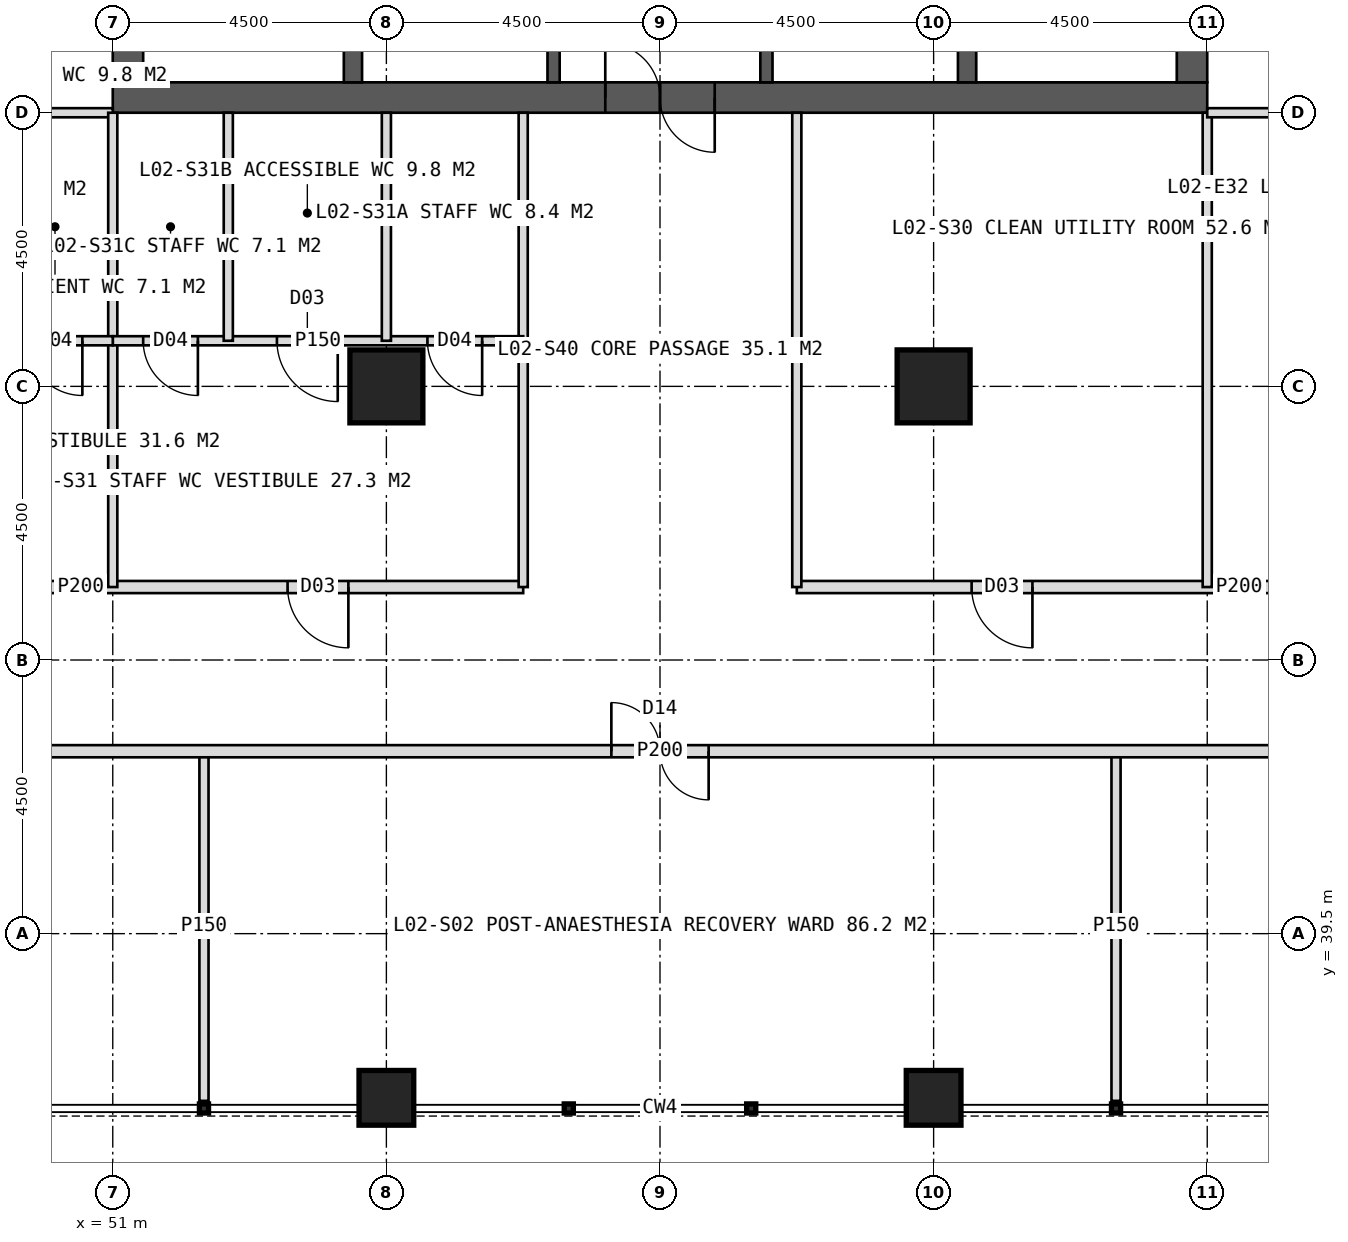
"""IFC4 building model, lengths in metres.
Left out: names, types, materials, properties, quantities, classifications, styles, units other than length and angle.
Written with IfcOpenShell. Run it as: python <this file> out.ifc"""

import sys

from ifc_helpers import new_model, si_unit, direction, frame, frame_2d, origin, origin_2d, place, context, subcontext, project, spatial, rectangle, hollow_rectangle, extrude, element, fill, save


model = new_model("IFC4")
c1 = context("Model", 3, precision=1e-05, world=origin(), true_north=direction((0.0, 1.0)))
c2 = subcontext(c1, "Body", "Model", "MODEL_VIEW")
j1 = project(units=[si_unit("LENGTHUNIT", "METRE"), si_unit("PLANEANGLEUNIT", "RADIAN")], contexts=[c1])
p1 = place(None, origin())
s1 = spatial("IfcSite", under=j1, at=p1, CompositionType="ELEMENT")
p2 = place(p1, origin())
s2 = spatial("IfcBuilding", under=s1, at=p2, CompositionType="ELEMENT")
p3 = place(p2, frame((0.0, 0.0, 11.0)))
s3 = spatial("IfcBuildingStorey", under=s2, at=p3, CompositionType="ELEMENT", Elevation=11.0)
p4 = place(p3, frame((51.0, 53.25, 0.0), z_axis=(0.0, 0.0, 1.0), x_axis=(1.0, 0.0, 0.0)))
e1 = element("IfcWall", 1, at=p4, inside=s3, PredefinedType="SHEAR", context=c2, shape_type="SweptSolid", body=[
    extrude(rectangle(XDim=18.0, YDim=0.5, at=frame_2d((9.0, 0.0))), origin(), (0.0, 0.0, 1.0), 5.5),
])
p5 = place(p4, frame((8.1, 0.0, 0.0)))
e2 = element("IfcOpeningElement", 2, at=p5, cuts=e1, PredefinedType="OPENING", context=c2, shape_type="SweptSolid", body=[
    extrude(rectangle(XDim=1.8, YDim=2.2, at=frame_2d((0.9, 1.1))), frame((0.0, 0.26, 0.0), z_axis=(0.0, -1.0, 0.0), x_axis=(1.0, 0.0, 0.0)), (0.0, 0.0, 1.0), 0.52),
])
p6 = place(p3, frame((51.25, 53.5, 0.0), z_axis=(0.0, 0.0, 1.0), x_axis=(0.0, 1.0, 0.0)))
e3 = element("IfcWall", 3, at=p6, inside=s3, PredefinedType="SHEAR", context=c2, shape_type="SweptSolid", body=[
    extrude(rectangle(XDim=17.0, YDim=0.5, at=frame_2d((8.5, 0.0))), origin(), (0.0, 0.0, 1.0), 5.5),
])
p7 = place(p6, frame((6.0, 0.0, 0.0)))
e4 = element("IfcOpeningElement", 4, at=p7, cuts=e3, PredefinedType="OPENING", context=c2, shape_type="SweptSolid", body=[
    extrude(rectangle(XDim=1.5, YDim=2.2, at=frame_2d((0.75, 1.1))), frame((0.0, 0.26, 0.0), z_axis=(0.0, -1.0, 0.0), x_axis=(1.0, 0.0, 0.0)), (0.0, 0.0, 1.0), 0.52),
])
p8 = place(p3, frame((68.75, 53.5, 0.0), z_axis=(0.0, 0.0, 1.0), x_axis=(0.0, 1.0, 0.0)))
e5 = element("IfcWall", 5, at=p8, inside=s3, PredefinedType="SHEAR", context=c2, shape_type="SweptSolid", body=[
    extrude(rectangle(XDim=17.0, YDim=0.5, at=frame_2d((8.5, 0.0))), origin(), (0.0, 0.0, 1.0), 5.5),
])
p9 = place(p8, frame((9.5, 0.0, 0.0)))
e6 = element("IfcOpeningElement", 6, at=p9, cuts=e5, PredefinedType="OPENING", context=c2, shape_type="SweptSolid", body=[
    extrude(rectangle(XDim=1.5, YDim=2.2, at=frame_2d((0.75, 1.1))), frame((0.0, 0.26, 0.0), z_axis=(0.0, -1.0, 0.0), x_axis=(1.0, 0.0, 0.0)), (0.0, 0.0, 1.0), 0.52),
])
for number, where, z_axis, x_axis in (
    (7, (54.95, 53.5, 0.0), (0.0, 0.0, 1.0), (0.0, 1.0, 0.0)),
    (8, (65.05, 53.5, 0.0), (0.0, 0.0, 1.0), (0.0, 1.0, 0.0)),
):
    element("IfcWall", number, at=place(p3, frame(where, z_axis=z_axis, x_axis=x_axis)), inside=s3, PredefinedType="SHEAR", context=c2, shape_type="SweptSolid", body=[
        extrude(rectangle(XDim=17.0, YDim=0.3, at=frame_2d((8.5, 0.0))), origin(), (0.0, 0.0, 1.0), 5.5),
    ])
p10 = place(p3, frame((58.25, 53.5, 0.0), z_axis=(0.0, 0.0, 1.0), x_axis=(0.0, 1.0, 0.0)))
e9 = element("IfcWall", 9, at=p10, inside=s3, PredefinedType="SHEAR", context=c2, shape_type="SweptSolid", body=[
    extrude(rectangle(XDim=17.0, YDim=0.2, at=frame_2d((8.5, 0.0))), origin(), (0.0, 0.0, 1.0), 5.5),
])
p11 = place(p10, frame((1.375, 0.0, 0.0)))
e10 = element("IfcOpeningElement", 10, at=p11, cuts=e9, PredefinedType="OPENING", context=c2, shape_type="SweptSolid", body=[
    extrude(rectangle(XDim=1.4, YDim=2.2, at=frame_2d((0.7, 1.1))), frame((0.0, 0.11, 0.0), z_axis=(0.0, -1.0, 0.0), x_axis=(1.0, 0.0, 0.0)), (0.0, 0.0, 1.0), 0.22),
])
p12 = place(p10, frame((5.675, 0.0, 0.0)))
e11 = element("IfcOpeningElement", 11, at=p12, cuts=e9, PredefinedType="OPENING", context=c2, shape_type="SweptSolid", body=[
    extrude(rectangle(XDim=1.4, YDim=2.2, at=frame_2d((0.7, 1.1))), frame((0.0, 0.11, 0.0), z_axis=(0.0, -1.0, 0.0), x_axis=(1.0, 0.0, 0.0)), (0.0, 0.0, 1.0), 0.22),
])
p13 = place(p3, frame((61.75, 53.5, 0.0), z_axis=(0.0, 0.0, 1.0), x_axis=(0.0, 1.0, 0.0)))
e12 = element("IfcWall", 12, at=p13, inside=s3, PredefinedType="SHEAR", context=c2, shape_type="SweptSolid", body=[
    extrude(rectangle(XDim=17.0, YDim=0.2, at=frame_2d((8.5, 0.0))), origin(), (0.0, 0.0, 1.0), 5.5),
])
p14 = place(p13, frame((1.375, 0.0, 0.0)))
e13 = element("IfcOpeningElement", 13, at=p14, cuts=e12, PredefinedType="OPENING", context=c2, shape_type="SweptSolid", body=[
    extrude(rectangle(XDim=1.4, YDim=2.2, at=frame_2d((0.7, 1.1))), frame((0.0, 0.11, 0.0), z_axis=(0.0, -1.0, 0.0), x_axis=(1.0, 0.0, 0.0)), (0.0, 0.0, 1.0), 0.22),
])
p15 = place(p13, frame((5.675, 0.0, 0.0)))
e14 = element("IfcOpeningElement", 14, at=p15, cuts=e12, PredefinedType="OPENING", context=c2, shape_type="SweptSolid", body=[
    extrude(rectangle(XDim=1.4, YDim=2.2, at=frame_2d((0.7, 1.1))), frame((0.0, 0.11, 0.0), z_axis=(0.0, -1.0, 0.0), x_axis=(1.0, 0.0, 0.0)), (0.0, 0.0, 1.0), 0.22),
])
for number, where, z_axis, x_axis in (
    (15, (55.5, 48.5, 0.0), (0.0, 0.0, 1.0), (1.0, 0.0, 0.0)),
    (16, (64.5, 48.5, 0.0), (0.0, 0.0, 1.0), (1.0, 0.0, 0.0)),
):
    element("IfcColumn", number, at=place(p3, frame(where, z_axis=z_axis, x_axis=x_axis)), inside=s3, PredefinedType="COLUMN", context=c2, shape_type="SweptSolid", body=[
        extrude(hollow_rectangle(XDim=1.2, YDim=1.2, WallThickness=0.1, at=origin_2d()), origin(), (0.0, 0.0, 1.0), 5.5),
    ])
for number, where, z_axis, x_axis in (
    (17, (55.5, 36.8, 0.0), (0.0, 0.0, 1.0), (1.0, 0.0, 0.0)),
    (18, (64.5, 36.8, 0.0), (0.0, 0.0, 1.0), (1.0, 0.0, 0.0)),
):
    element("IfcColumn", number, at=place(p3, frame(where, z_axis=z_axis, x_axis=x_axis)), inside=s3, PredefinedType="COLUMN", context=c2, shape_type="SweptSolid", body=[
        extrude(hollow_rectangle(XDim=0.9, YDim=0.9, WallThickness=0.08, at=origin_2d()), origin(), (0.0, 0.0, 1.0), 5.5),
    ])
p16 = place(p3, frame((51.0, 53.0, 0.0), z_axis=(0.0, 0.0, 1.0), x_axis=(-1.0, 0.0, 0.0)))
e19 = element("IfcWall", 19, at=p16, inside=s3, PredefinedType="PARTITIONING", context=c2, shape_type="SweptSolid", body=[
    extrude(rectangle(XDim=7.8, YDim=0.15, at=frame_2d((3.9, 0.0))), origin(), (0.0, 0.0, 1.0), 5.2),
])
for number, where, z_axis, x_axis in (
    (20, (67.5, 42.5, 0.0), (0.0, 0.0, 1.0), (0.0, -1.0, 0.0)),
    (21, (52.5, 42.5, 0.0), (0.0, 0.0, 1.0), (0.0, -1.0, 0.0)),
):
    element("IfcWall", number, at=place(p3, frame(where, z_axis=z_axis, x_axis=x_axis)), inside=s3, PredefinedType="PARTITIONING", context=c2, shape_type="SweptSolid", body=[
        extrude(rectangle(XDim=5.75, YDim=0.15, at=frame_2d((2.875, 0.0))), origin(), (0.0, 0.0, 1.0), 5.2),
    ])
p17 = place(p3, frame((79.5, 42.5, 0.0), z_axis=(0.0, 0.0, 1.0), x_axis=(-1.0, 0.0, 0.0)))
e22 = element("IfcWall", 22, at=p17, inside=s3, PredefinedType="PARTITIONING", context=c2, shape_type="SweptSolid", body=[
    extrude(rectangle(XDim=39.0, YDim=0.2, at=frame_2d((19.5, 0.0))), origin(), (0.0, 0.0, 1.0), 5.2),
])
p18 = place(p17, frame((5.2, 0.0, 0.0)))
e23 = element("IfcOpeningElement", 23, at=p18, cuts=e22, PredefinedType="OPENING", context=c2, shape_type="SweptSolid", body=[
    extrude(rectangle(XDim=1.6, YDim=2.2, at=frame_2d((0.8, 1.1))), frame((0.0, 0.11, 0.0), z_axis=(0.0, -1.0, 0.0), x_axis=(1.0, 0.0, 0.0)), (0.0, 0.0, 1.0), 0.22),
])
p19 = place(p17, frame((18.7, 0.0, 0.0)))
e24 = element("IfcOpeningElement", 24, at=p19, cuts=e22, PredefinedType="OPENING", context=c2, shape_type="SweptSolid", body=[
    extrude(rectangle(XDim=1.6, YDim=2.2, at=frame_2d((0.8, 1.1))), frame((0.0, 0.11, 0.0), z_axis=(0.0, -1.0, 0.0), x_axis=(1.0, 0.0, 0.0)), (0.0, 0.0, 1.0), 0.22),
])
p20 = place(p17, frame((32.5, 0.0, 0.0)))
e25 = element("IfcOpeningElement", 25, at=p20, cuts=e22, PredefinedType="OPENING", context=c2, shape_type="SweptSolid", body=[
    extrude(rectangle(XDim=1.0, YDim=2.1, at=frame_2d((0.5, 1.05))), frame((0.0, 0.11, 0.0), z_axis=(0.0, -1.0, 0.0), x_axis=(1.0, 0.0, 0.0)), (0.0, 0.0, 1.0), 0.22),
])
p21 = place(p3, frame((76.8, 45.2, 0.0), z_axis=(0.0, 0.0, 1.0), x_axis=(-1.0, 0.0, 0.0)))
e26 = element("IfcWall", 26, at=p21, inside=s3, PredefinedType="PARTITIONING", context=c2, shape_type="SweptSolid", body=[
    extrude(rectangle(XDim=14.55, YDim=0.2, at=frame_2d((7.275, 0.0))), origin(), (0.0, 0.0, 1.0), 5.2),
])
p22 = place(p21, frame((10.675, 0.0, 0.0)))
e27 = element("IfcOpeningElement", 27, at=p22, cuts=e26, PredefinedType="OPENING", context=c2, shape_type="SweptSolid", body=[
    extrude(rectangle(XDim=1.0, YDim=2.1, at=frame_2d((0.5, 1.05))), frame((0.0, 0.11, 0.0), z_axis=(0.0, -1.0, 0.0), x_axis=(1.0, 0.0, 0.0)), (0.0, 0.0, 1.0), 0.22),
])
p23 = place(p3, frame((57.75, 45.2, 0.0), z_axis=(0.0, 0.0, 1.0), x_axis=(-1.0, 0.0, 0.0)))
e28 = element("IfcWall", 28, at=p23, inside=s3, PredefinedType="PARTITIONING", context=c2, shape_type="SweptSolid", body=[
    extrude(rectangle(XDim=14.55, YDim=0.2, at=frame_2d((7.275, 0.0))), origin(), (0.0, 0.0, 1.0), 5.2),
])
p24 = place(p23, frame((2.875, 0.0, 0.0)))
e29 = element("IfcOpeningElement", 29, at=p24, cuts=e28, PredefinedType="OPENING", context=c2, shape_type="SweptSolid", body=[
    extrude(rectangle(XDim=1.0, YDim=2.1, at=frame_2d((0.5, 1.05))), frame((0.0, 0.11, 0.0), z_axis=(0.0, -1.0, 0.0), x_axis=(1.0, 0.0, 0.0)), (0.0, 0.0, 1.0), 0.22),
])
p25 = place(p23, frame((10.15, 0.0, 0.0)))
e30 = element("IfcOpeningElement", 30, at=p25, cuts=e28, PredefinedType="OPENING", context=c2, shape_type="SweptSolid", body=[
    extrude(rectangle(XDim=1.0, YDim=2.1, at=frame_2d((0.5, 1.05))), frame((0.0, 0.11, 0.0), z_axis=(0.0, -1.0, 0.0), x_axis=(1.0, 0.0, 0.0)), (0.0, 0.0, 1.0), 0.22),
])
for number, where, z_axis, x_axis in (
    (31, (69.0, 53.0, 0.0), (0.0, 0.0, 1.0), (0.0, -1.0, 0.0)),
    (32, (62.25, 53.0, 0.0), (0.0, 0.0, 1.0), (0.0, -1.0, 0.0)),
    (33, (57.75, 53.0, 0.0), (0.0, 0.0, 1.0), (0.0, -1.0, 0.0)),
    (34, (51.0, 53.0, 0.0), (0.0, 0.0, 1.0), (0.0, -1.0, 0.0)),
):
    element("IfcWall", number, at=place(p3, frame(where, z_axis=z_axis, x_axis=x_axis)), inside=s3, PredefinedType="PARTITIONING", context=c2, shape_type="SweptSolid", body=[
        extrude(rectangle(XDim=7.8, YDim=0.15, at=frame_2d((3.9, 0.0))), origin(), (0.0, 0.0, 1.0), 5.2),
    ])
p26 = place(p3, frame((57.75, 49.25, 0.0), z_axis=(0.0, 0.0, 1.0), x_axis=(-1.0, 0.0, 0.0)))
e35 = element("IfcWall", 35, at=p26, inside=s3, PredefinedType="PARTITIONING", context=c2, shape_type="SweptSolid", body=[
    extrude(rectangle(XDim=6.75, YDim=0.15, at=frame_2d((3.375, 0.0))), origin(), (0.0, 0.0, 1.0), 5.2),
])
p27 = place(p26, frame((0.675, 0.0, 0.0)))
e36 = element("IfcOpeningElement", 36, at=p27, cuts=e35, PredefinedType="OPENING", context=c2, shape_type="SweptSolid", body=[
    extrude(rectangle(XDim=0.9, YDim=2.1, at=frame_2d((0.45, 1.05))), frame((0.0, 0.085, 0.0), z_axis=(0.0, -1.0, 0.0), x_axis=(1.0, 0.0, 0.0)), (0.0, 0.0, 1.0), 0.17),
])
p28 = place(p26, frame((3.05, 0.0, 0.0)))
e37 = element("IfcOpeningElement", 37, at=p28, cuts=e35, PredefinedType="OPENING", context=c2, shape_type="SweptSolid", body=[
    extrude(rectangle(XDim=1.0, YDim=2.1, at=frame_2d((0.5, 1.05))), frame((0.0, 0.085, 0.0), z_axis=(0.0, -1.0, 0.0), x_axis=(1.0, 0.0, 0.0)), (0.0, 0.0, 1.0), 0.17),
])
p29 = place(p26, frame((5.35, 0.0, 0.0)))
e38 = element("IfcOpeningElement", 38, at=p29, cuts=e35, PredefinedType="OPENING", context=c2, shape_type="SweptSolid", body=[
    extrude(rectangle(XDim=0.9, YDim=2.1, at=frame_2d((0.45, 1.05))), frame((0.0, 0.085, 0.0), z_axis=(0.0, -1.0, 0.0), x_axis=(1.0, 0.0, 0.0)), (0.0, 0.0, 1.0), 0.17),
])
p30 = place(p3, frame((55.5, 53.0, 0.0), z_axis=(0.0, 0.0, 1.0), x_axis=(0.0, -1.0, 0.0)))
e39 = element("IfcWall", 39, at=p30, inside=s3, PredefinedType="PARTITIONING", context=c2, shape_type="SweptSolid", body=[
    extrude(rectangle(XDim=3.75, YDim=0.15, at=frame_2d((1.875, 0.0))), origin(), (0.0, 0.0, 1.0), 4.3),
])
p31 = place(p3, frame((52.9, 53.0, 0.0), z_axis=(0.0, 0.0, 1.0), x_axis=(0.0, -1.0, 0.0)))
e40 = element("IfcWall", 40, at=p31, inside=s3, PredefinedType="PARTITIONING", context=c2, shape_type="SweptSolid", body=[
    extrude(rectangle(XDim=3.75, YDim=0.15, at=frame_2d((1.875, 0.0))), origin(), (0.0, 0.0, 1.0), 5.2),
])
p32 = place(p3, frame((51.0, 49.25, 0.0), z_axis=(0.0, 0.0, 1.0), x_axis=(-1.0, 0.0, 0.0)))
e41 = element("IfcWall", 41, at=p32, inside=s3, PredefinedType="PARTITIONING", context=c2, shape_type="SweptSolid", body=[
    extrude(rectangle(XDim=7.8, YDim=0.15, at=frame_2d((3.9, 0.0))), origin(), (0.0, 0.0, 1.0), 5.2),
])
p33 = place(p32, frame((0.5, 0.0, 0.0)))
e42 = element("IfcOpeningElement", 42, at=p33, cuts=e41, PredefinedType="OPENING", context=c2, shape_type="SweptSolid", body=[
    extrude(rectangle(XDim=0.9, YDim=2.1, at=frame_2d((0.45, 1.05))), frame((0.0, 0.085, 0.0), z_axis=(0.0, -1.0, 0.0), x_axis=(1.0, 0.0, 0.0)), (0.0, 0.0, 1.0), 0.17),
])
p34 = place(p32, frame((2.7, 0.0, 0.0)))
e43 = element("IfcOpeningElement", 43, at=p34, cuts=e41, PredefinedType="OPENING", context=c2, shape_type="SweptSolid", body=[
    extrude(rectangle(XDim=1.0, YDim=2.1, at=frame_2d((0.5, 1.05))), frame((0.0, 0.085, 0.0), z_axis=(0.0, -1.0, 0.0), x_axis=(1.0, 0.0, 0.0)), (0.0, 0.0, 1.0), 0.17),
])
p35 = place(p32, frame((5.7, 0.0, 0.0)))
e44 = element("IfcOpeningElement", 44, at=p35, cuts=e41, PredefinedType="OPENING", context=c2, shape_type="SweptSolid", body=[
    extrude(rectangle(XDim=0.9, YDim=2.1, at=frame_2d((0.45, 1.05))), frame((0.0, 0.085, 0.0), z_axis=(0.0, -1.0, 0.0), x_axis=(1.0, 0.0, 0.0)), (0.0, 0.0, 1.0), 0.17),
])
p36 = place(p3, frame((69.0, 53.0, 0.0), z_axis=(0.0, 0.0, 1.0), x_axis=(1.0, 0.0, 0.0)))
e45 = element("IfcWall", 45, at=p36, inside=s3, PredefinedType="PARTITIONING", context=c2, shape_type="SweptSolid", body=[
    extrude(rectangle(XDim=7.8, YDim=0.15, at=frame_2d((3.9, 0.0))), origin(), (0.0, 0.0, 1.0), 5.2),
])
p37 = place(p22, origin())
e46 = element("IfcDoor", 46, at=p37, inside=s3, OperationType="SINGLE_SWING_LEFT", PredefinedType="DOOR", context=c2, shape_type="SweptSolid", body=[
    extrude(rectangle(XDim=1.0, YDim=2.1, at=frame_2d((0.5, 1.05))), frame((0.0, 0.025, 0.0), z_axis=(0.0, -1.0, 0.0), x_axis=(1.0, 0.0, 0.0)), (0.0, 0.0, 1.0), 0.05),
])
fill(e27, e46)
p38 = place(p24, origin())
e47 = element("IfcDoor", 47, at=p38, inside=s3, OperationType="SINGLE_SWING_LEFT", PredefinedType="DOOR", context=c2, shape_type="SweptSolid", body=[
    extrude(rectangle(XDim=1.0, YDim=2.1, at=frame_2d((0.5, 1.05))), frame((0.0, 0.025, 0.0), z_axis=(0.0, -1.0, 0.0), x_axis=(1.0, 0.0, 0.0)), (0.0, 0.0, 1.0), 0.05),
])
fill(e29, e47)
p39 = place(p5, origin())
e48 = element("IfcDoor", 48, at=p39, inside=s3, OperationType="DOUBLE_DOOR_SINGLE_SWING", PredefinedType="DOOR", context=c2, shape_type="SweptSolid", body=[
    extrude(rectangle(XDim=1.8, YDim=2.2, at=frame_2d((0.9, 1.1))), frame((0.0, 0.025, 0.0), z_axis=(0.0, -1.0, 0.0), x_axis=(1.0, 0.0, 0.0)), (0.0, 0.0, 1.0), 0.05),
])
fill(e2, e48)
p40 = place(p19, origin())
e49 = element("IfcDoor", 49, at=p40, inside=s3, OperationType="DOUBLE_DOOR_DOUBLE_SWING", PredefinedType="DOOR", context=c2, shape_type="SweptSolid", body=[
    extrude(rectangle(XDim=1.6, YDim=2.2, at=frame_2d((0.8, 1.1))), frame((0.0, 0.025, 0.0), z_axis=(0.0, -1.0, 0.0), x_axis=(1.0, 0.0, 0.0)), (0.0, 0.0, 1.0), 0.05),
])
fill(e24, e49)
p41 = place(p27, origin())
e50 = element("IfcDoor", 50, at=p41, inside=s3, OperationType="SINGLE_SWING_LEFT", PredefinedType="DOOR", context=c2, shape_type="SweptSolid", body=[
    extrude(rectangle(XDim=0.9, YDim=2.1, at=frame_2d((0.45, 1.05))), frame((0.0, 0.025, 0.0), z_axis=(0.0, -1.0, 0.0), x_axis=(1.0, 0.0, 0.0)), (0.0, 0.0, 1.0), 0.05),
])
fill(e36, e50)
p42 = place(p28, origin())
e51 = element("IfcDoor", 51, at=p42, inside=s3, OperationType="SINGLE_SWING_LEFT", PredefinedType="DOOR", context=c2, shape_type="SweptSolid", body=[
    extrude(rectangle(XDim=1.0, YDim=2.1, at=frame_2d((0.5, 1.05))), frame((0.0, 0.025, 0.0), z_axis=(0.0, -1.0, 0.0), x_axis=(1.0, 0.0, 0.0)), (0.0, 0.0, 1.0), 0.05),
])
fill(e37, e51)
p43 = place(p29, origin())
e52 = element("IfcDoor", 52, at=p43, inside=s3, OperationType="SINGLE_SWING_LEFT", PredefinedType="DOOR", context=c2, shape_type="SweptSolid", body=[
    extrude(rectangle(XDim=0.9, YDim=2.1, at=frame_2d((0.45, 1.05))), frame((0.0, 0.025, 0.0), z_axis=(0.0, -1.0, 0.0), x_axis=(1.0, 0.0, 0.0)), (0.0, 0.0, 1.0), 0.05),
])
fill(e38, e52)
p44 = place(p33, origin())
e53 = element("IfcDoor", 53, at=p44, inside=s3, OperationType="SINGLE_SWING_LEFT", PredefinedType="DOOR", context=c2, shape_type="SweptSolid", body=[
    extrude(rectangle(XDim=0.9, YDim=2.1, at=frame_2d((0.45, 1.05))), frame((0.0, 0.025, 0.0), z_axis=(0.0, -1.0, 0.0), x_axis=(1.0, 0.0, 0.0)), (0.0, 0.0, 1.0), 0.05),
])
fill(e42, e53)
save(model, sys.argv[1])
